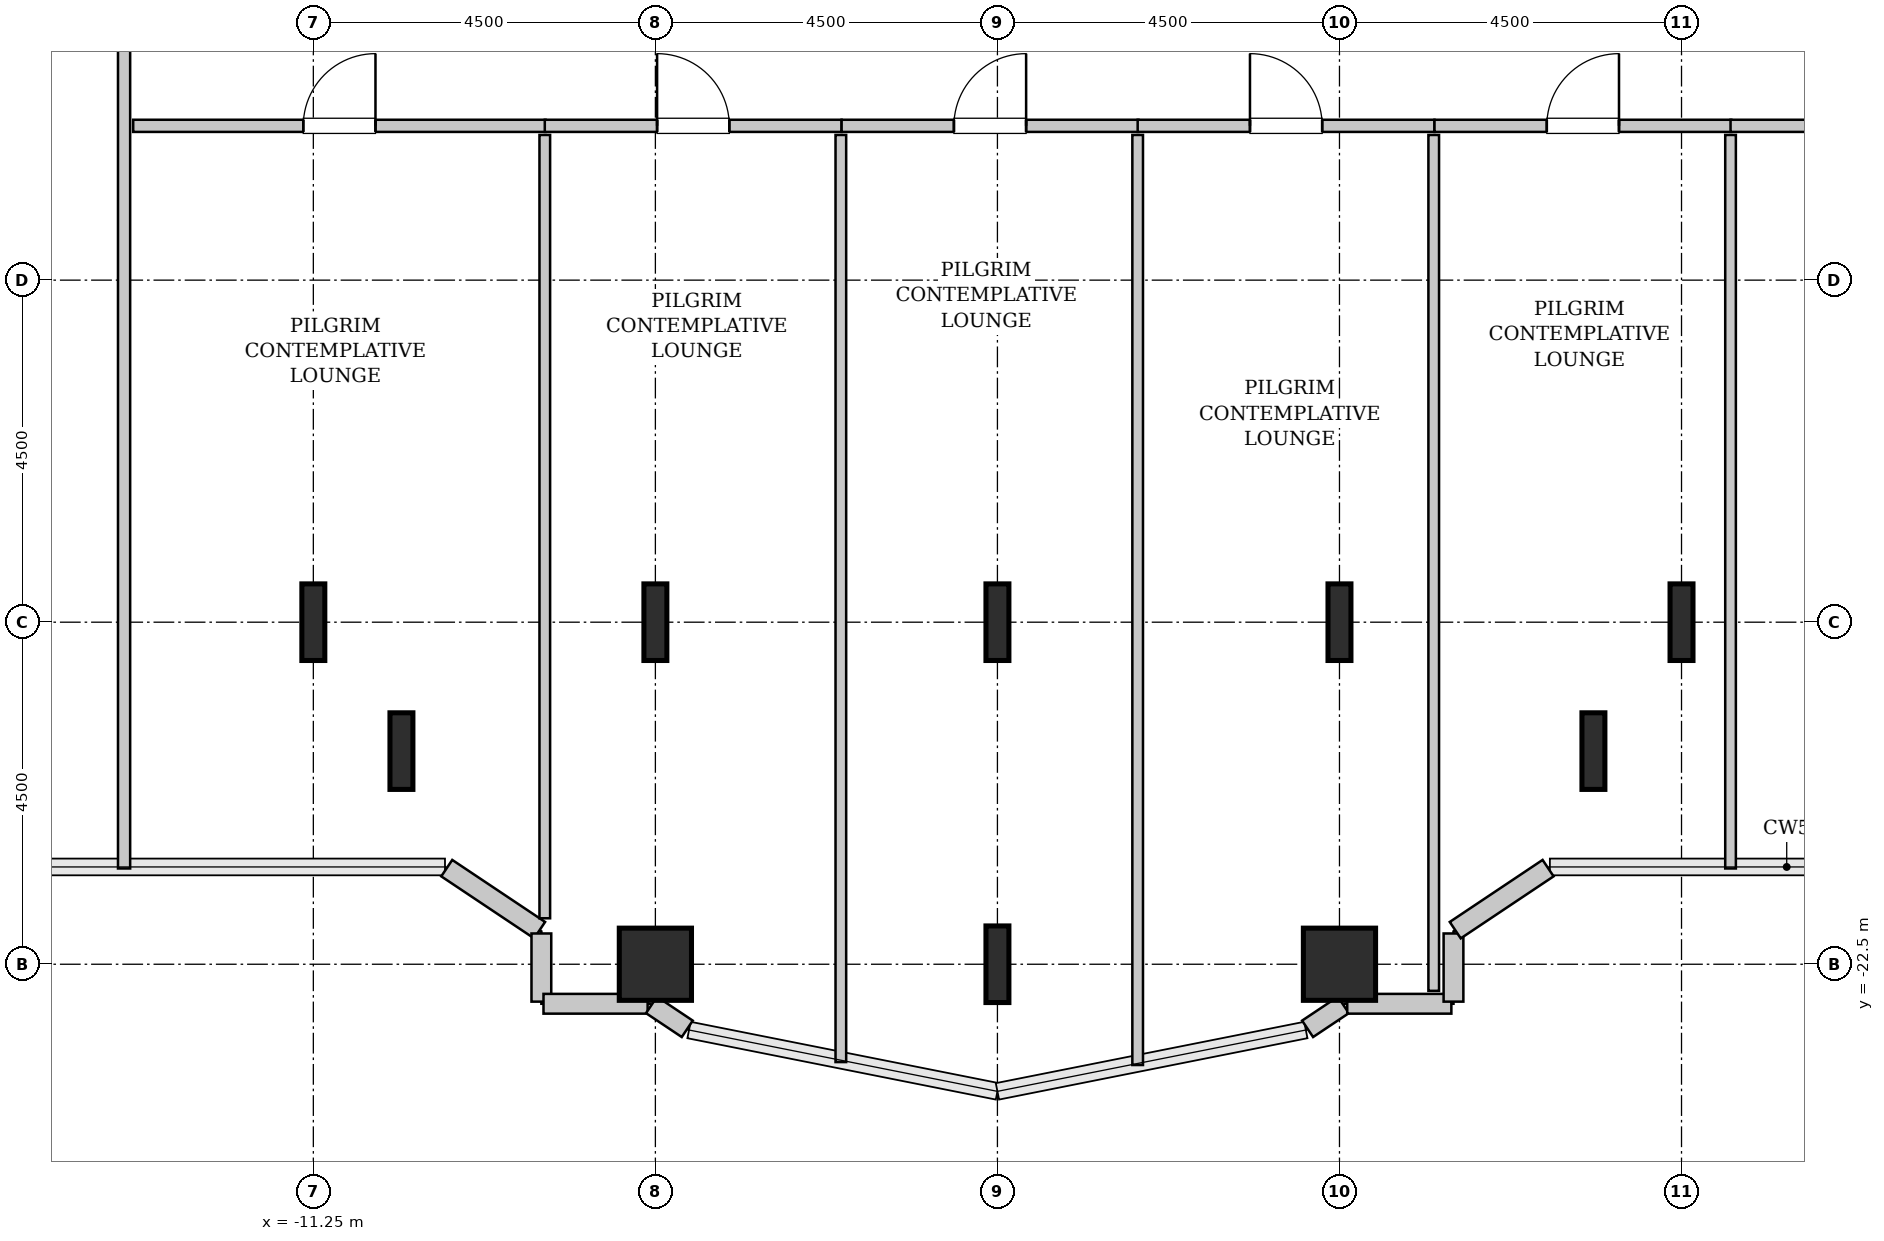
"""IFC4 building model, lengths in metres.
Left out: names, types, materials, properties, quantities, classifications, styles, units other than length and angle.
Written with IfcOpenShell. Run it as: python <this file> out.ifc"""

import sys

from ifc_helpers import new_model, si_unit, direction, frame, frame_2d, origin, origin_2d, place, context, subcontext, project, spatial, rectangle, hollow_rectangle, i_section, extrude, source, transform, mapped, element, fill, save


model = new_model("IFC4")
c1 = context("Model", 3, precision=1e-05, world=origin(), true_north=direction((0.0, 1.0)))
c2 = subcontext(c1, "Body", "Model", "MODEL_VIEW")
j1 = project(units=[si_unit("LENGTHUNIT", "METRE"), si_unit("PLANEANGLEUNIT", "RADIAN")], contexts=[c1])
p1 = place(None, origin())
s1 = spatial("IfcSite", under=j1, at=p1, CompositionType="ELEMENT")
p2 = place(p1, origin())
s2 = spatial("IfcBuilding", under=s1, at=p2, CompositionType="ELEMENT")
p3 = place(p2, frame((0.0, 0.0, 94.6)))
s3 = spatial("IfcBuildingStorey", under=s2, at=p3, CompositionType="ELEMENT", Elevation=94.6)
m1 = source(origin(), c2, "Body", "SweptSolid", [
    extrude(i_section(OverallWidth=0.302, OverallDepth=1.008, WebThickness=0.021, FlangeThickness=0.04, FilletRadius=0.03, at=origin_2d()), origin(), (0.0, 0.0, 1.0), 3.8),
])
for number, where, z_axis, x_axis in (
    (1, (-11.25, -18.0, 0.0), (0.0, 0.0, 1.0), (1.0, 0.0, 0.0)),
    (2, (-10.091, -19.696, 0.0), (0.0, 0.0, 1.0), (1.0, 0.0, 0.0)),
):
    element("IfcColumn", number, at=place(p3, frame(where, z_axis=z_axis, x_axis=x_axis)), inside=s3, PredefinedType="COLUMN", context=c2, shape_type="MappedRepresentation", body=[
        mapped(m1, transform((0.0, 0.0, 0.0), x_axis=(1.0, 0.0, 0.0), y_axis=(0.0, 1.0, 0.0), z_axis=(0.0, 0.0, 1.0), scale=1.0)),
    ])
m2 = source(origin(), c2, "Body", "SweptSolid", [
    extrude(hollow_rectangle(XDim=0.95, YDim=0.95, WallThickness=0.045, InnerFilletRadius=0.045, OuterFilletRadius=0.09, at=origin_2d()), origin(), (0.0, 0.0, 1.0), 3.8),
])
p4 = place(p3, frame((-6.75, -22.5, 0.0), z_axis=(0.0, 0.0, 1.0), x_axis=(1.0, 0.0, 0.0)))
e3 = element("IfcColumn", 3, at=p4, inside=s3, PredefinedType="COLUMN", context=c2, shape_type="MappedRepresentation", body=[
    mapped(m2, transform((0.0, 0.0, 0.0), x_axis=(1.0, 0.0, 0.0), y_axis=(0.0, 1.0, 0.0), z_axis=(0.0, 0.0, 1.0), scale=1.0)),
])
for number, where, z_axis, x_axis in (
    (4, (-6.75, -18.0, 0.0), (0.0, 0.0, 1.0), (1.0, 0.0, 0.0)),
    (5, (-2.25, -22.5, 0.0), (0.0, 0.0, 1.0), (1.0, 0.0, 0.0)),
    (6, (-2.25, -18.0, 0.0), (0.0, 0.0, 1.0), (1.0, 0.0, 0.0)),
):
    element("IfcColumn", number, at=place(p3, frame(where, z_axis=z_axis, x_axis=x_axis)), inside=s3, PredefinedType="COLUMN", context=c2, shape_type="MappedRepresentation", body=[
        mapped(m1, transform((0.0, 0.0, 0.0), x_axis=(1.0, 0.0, 0.0), y_axis=(0.0, 1.0, 0.0), z_axis=(0.0, 0.0, 1.0), scale=1.0)),
    ])
p5 = place(p3, frame((2.25, -22.5, 0.0), z_axis=(0.0, 0.0, 1.0), x_axis=(1.0, 0.0, 0.0)))
e7 = element("IfcColumn", 7, at=p5, inside=s3, PredefinedType="COLUMN", context=c2, shape_type="MappedRepresentation", body=[
    mapped(m2, transform((0.0, 0.0, 0.0), x_axis=(1.0, 0.0, 0.0), y_axis=(0.0, 1.0, 0.0), z_axis=(0.0, 0.0, 1.0), scale=1.0)),
])
for number, where, z_axis, x_axis in (
    (8, (2.25, -18.0, 0.0), (0.0, 0.0, 1.0), (1.0, 0.0, 0.0)),
    (9, (5.591, -19.696, 0.0), (0.0, 0.0, 1.0), (1.0, 0.0, 0.0)),
    (10, (6.75, -18.0, 0.0), (0.0, 0.0, 1.0), (1.0, 0.0, 0.0)),
):
    element("IfcColumn", number, at=place(p3, frame(where, z_axis=z_axis, x_axis=x_axis)), inside=s3, PredefinedType="COLUMN", context=c2, shape_type="MappedRepresentation", body=[
        mapped(m1, transform((0.0, 0.0, 0.0), x_axis=(1.0, 0.0, 0.0), y_axis=(0.0, 1.0, 0.0), z_axis=(0.0, 0.0, 1.0), scale=1.0)),
    ])
m3 = source(origin(), c2, "Body", "SweptSolid", [
    extrude(rectangle(XDim=1.469, YDim=0.26, at=frame_2d((0.734, 0.0))), origin(), (0.0, 0.0, 1.0), 3.55),
])
p6 = place(p3, frame((-9.495, -21.236, 0.0), z_axis=(0.0, 0.0, 1.0), x_axis=(0.831461760506, -0.555581983884, 0.0)))
e11 = element("IfcWall", 11, at=p6, inside=s3, PredefinedType="SOLIDWALL", context=c2, shape_type="MappedRepresentation", body=[
    mapped(m3, transform((0.0, 0.0, 0.0), x_axis=(1.0, 0.0, 0.0), y_axis=(0.0, 1.0, 0.0), z_axis=(0.0, 0.0, 1.0), scale=1.0)),
])
m4 = source(origin(), c2, "Body", "SweptSolid", [
    extrude(rectangle(XDim=0.897, YDim=0.26, at=frame_2d((0.448, 0.0))), origin(), (0.0, 0.0, 1.0), 3.55),
])
p7 = place(p3, frame((-8.25, -22.095, 0.0), z_axis=(0.0, 0.0, 1.0), x_axis=(0.0, -1.0, 0.0)))
e12 = element("IfcWall", 12, at=p7, inside=s3, PredefinedType="SOLIDWALL", context=c2, shape_type="MappedRepresentation", body=[
    mapped(m4, transform((0.0, 0.0, 0.0), x_axis=(1.0, 0.0, 0.0), y_axis=(0.0, 1.0, 0.0), z_axis=(0.0, 0.0, 1.0), scale=1.0)),
])
m5 = source(origin(), c2, "Body", "SweptSolid", [
    extrude(rectangle(XDim=1.37, YDim=0.26, at=frame_2d((0.685, 0.0))), origin(), (0.0, 0.0, 1.0), 3.55),
])
p8 = place(p3, frame((-8.222, -23.02, 0.0), z_axis=(0.0, 0.0, 1.0), x_axis=(1.0, 0.0, 0.0)))
e13 = element("IfcWall", 13, at=p8, inside=s3, PredefinedType="SOLIDWALL", context=c2, shape_type="MappedRepresentation", body=[
    mapped(m5, transform((0.0, 0.0, 0.0), x_axis=(1.0, 0.0, 0.0), y_axis=(0.0, 1.0, 0.0), z_axis=(0.0, 0.0, 1.0), scale=1.0)),
])
m6 = source(origin(), c2, "Body", "SweptSolid", [
    extrude(rectangle(XDim=0.565, YDim=0.26, at=frame_2d((0.283, 0.0))), origin(), (0.0, 0.0, 1.0), 3.55),
])
for number, where, z_axis, x_axis in (
    (14, (-6.801, -23.036, 0.0), (0.0, 0.0, 1.0), (0.832, -0.555, 0.0)),
    (15, (1.831, -23.35, 0.0), (0.0, 0.0, 1.0), (0.832, 0.555, 0.0)),
):
    element("IfcWall", number, at=place(p3, frame(where, z_axis=z_axis, x_axis=x_axis)), inside=s3, PredefinedType="SOLIDWALL", context=c2, shape_type="MappedRepresentation", body=[
        mapped(m6, transform((0.0, 0.0, 0.0), x_axis=(1.0, 0.0, 0.0), y_axis=(0.0, 1.0, 0.0), z_axis=(0.0, 0.0, 1.0), scale=1.0)),
    ])
p9 = place(p3, frame((2.352, -23.02, 0.0), z_axis=(0.0, 0.0, 1.0), x_axis=(1.0, 0.0, 0.0)))
e16 = element("IfcWall", 16, at=p9, inside=s3, PredefinedType="SOLIDWALL", context=c2, shape_type="MappedRepresentation", body=[
    mapped(m5, transform((0.0, 0.0, 0.0), x_axis=(1.0, 0.0, 0.0), y_axis=(0.0, 1.0, 0.0), z_axis=(0.0, 0.0, 1.0), scale=1.0)),
])
p10 = place(p3, frame((3.75, -22.992, 0.0), z_axis=(0.0, 0.0, 1.0), x_axis=(0.0, 1.0, 0.0)))
e17 = element("IfcWall", 17, at=p10, inside=s3, PredefinedType="SOLIDWALL", context=c2, shape_type="MappedRepresentation", body=[
    mapped(m4, transform((0.0, 0.0, 0.0), x_axis=(1.0, 0.0, 0.0), y_axis=(0.0, 1.0, 0.0), z_axis=(0.0, 0.0, 1.0), scale=1.0)),
])
p11 = place(p3, frame((3.773, -22.052, 0.0), z_axis=(0.0, 0.0, 1.0), x_axis=(0.831461760506, 0.555581983884, 0.0)))
e18 = element("IfcWall", 18, at=p11, inside=s3, PredefinedType="SOLIDWALL", context=c2, shape_type="MappedRepresentation", body=[
    mapped(m3, transform((0.0, 0.0, 0.0), x_axis=(1.0, 0.0, 0.0), y_axis=(0.0, 1.0, 0.0), z_axis=(0.0, 0.0, 1.0), scale=1.0)),
])
m7 = source(origin(), c2, "Body", "SweptSolid", [
    extrude(rectangle(XDim=12.845, YDim=0.16, at=frame_2d((6.422, 0.0))), origin(), (0.0, 0.0, 1.0), 3.535),
])
p12 = place(p3, frame((-13.74, -21.24, 0.0), z_axis=(0.0, 0.0, 1.0), x_axis=(0.0, 1.0, 0.0)))
e19 = element("IfcWall", 19, at=p12, inside=s3, PredefinedType="PARTITIONING", context=c2, shape_type="MappedRepresentation", body=[
    mapped(m7, transform((0.0, 0.0, 0.0), x_axis=(1.0, 0.0, 0.0), y_axis=(0.0, 1.0, 0.0), z_axis=(0.0, 0.0, 1.0), scale=1.0)),
])
p13 = place(p12, frame((10.812, 0.0, 0.0)))
e20 = element("IfcOpeningElement", 20, at=p13, cuts=e19, PredefinedType="OPENING", context=c2, shape_type="SweptSolid", body=[
    extrude(rectangle(XDim=0.95, YDim=2.1, at=frame_2d((0.475, 1.05))), frame((0.0, 0.09, 0.0), z_axis=(0.0, -1.0, 0.0), x_axis=(1.0, 0.0, 0.0)), (0.0, 0.0, 1.0), 0.18),
])
m8 = source(origin(), c2, "Body", "SweptSolid", [
    extrude(rectangle(XDim=5.425, YDim=0.16, at=frame_2d((2.712, 0.0))), origin(), (0.0, 0.0, 1.0), 3.535),
])
p14 = place(p3, frame((-13.62, -11.47, 0.0), z_axis=(0.0, 0.0, 1.0), x_axis=(1.0, 0.0, 0.0)))
e21 = element("IfcWall", 21, at=p14, inside=s3, PredefinedType="PARTITIONING", context=c2, shape_type="MappedRepresentation", body=[
    mapped(m8, transform((0.0, 0.0, 0.0), x_axis=(1.0, 0.0, 0.0), y_axis=(0.0, 1.0, 0.0), z_axis=(0.0, 0.0, 1.0), scale=1.0)),
])
p15 = place(p14, frame((2.238, 0.0, 0.0)))
e22 = element("IfcOpeningElement", 22, at=p15, cuts=e21, PredefinedType="OPENING", context=c2, shape_type="SweptSolid", body=[
    extrude(rectangle(XDim=0.95, YDim=2.1, at=frame_2d((0.475, 1.05))), frame((0.0, 0.09, 0.0), z_axis=(0.0, -1.0, 0.0), x_axis=(1.0, 0.0, 0.0)), (0.0, 0.0, 1.0), 0.18),
])
m9 = source(origin(), c2, "Body", "SweptSolid", [
    extrude(rectangle(XDim=10.305, YDim=0.14, at=frame_2d((5.153, 0.0))), origin(), (0.0, 0.0, 1.0), 3.535),
])
p16 = place(p3, frame((-8.205, -21.895, 0.0), z_axis=(0.0, 0.0, 1.0), x_axis=(0.0, 1.0, 0.0)))
e23 = element("IfcWall", 23, at=p16, inside=s3, PredefinedType="PARTITIONING", context=c2, shape_type="MappedRepresentation", body=[
    mapped(m9, transform((0.0, 0.0, 0.0), x_axis=(1.0, 0.0, 0.0), y_axis=(0.0, 1.0, 0.0), z_axis=(0.0, 0.0, 1.0), scale=1.0)),
])
m10 = source(origin(), c2, "Body", "SweptSolid", [
    extrude(rectangle(XDim=3.905, YDim=0.16, at=frame_2d((1.953, 0.0))), origin(), (0.0, 0.0, 1.0), 3.535),
])
p17 = place(p3, frame((-8.205, -11.47, 0.0), z_axis=(0.0, 0.0, 1.0), x_axis=(1.0, 0.0, 0.0)))
e24 = element("IfcWall", 24, at=p17, inside=s3, PredefinedType="PARTITIONING", context=c2, shape_type="MappedRepresentation", body=[
    mapped(m10, transform((0.0, 0.0, 0.0), x_axis=(1.0, 0.0, 0.0), y_axis=(0.0, 1.0, 0.0), z_axis=(0.0, 0.0, 1.0), scale=1.0)),
])
p18 = place(p17, frame((1.478, 0.0, 0.0)))
e25 = element("IfcOpeningElement", 25, at=p18, cuts=e24, PredefinedType="OPENING", context=c2, shape_type="SweptSolid", body=[
    extrude(rectangle(XDim=0.95, YDim=2.1, at=frame_2d((0.475, 1.05))), frame((0.0, 0.09, 0.0), z_axis=(0.0, -1.0, 0.0), x_axis=(1.0, 0.0, 0.0)), (0.0, 0.0, 1.0), 0.18),
])
m11 = source(origin(), c2, "Body", "SweptSolid", [
    extrude(rectangle(XDim=12.197, YDim=0.14, at=frame_2d((6.099, 0.0))), origin(), (0.0, 0.0, 1.0), 3.535),
])
p19 = place(p3, frame((-4.31, -23.787, 0.0), z_axis=(0.0, 0.0, 1.0), x_axis=(0.0, 1.0, 0.0)))
e26 = element("IfcWall", 26, at=p19, inside=s3, PredefinedType="PARTITIONING", context=c2, shape_type="MappedRepresentation", body=[
    mapped(m11, transform((0.0, 0.0, 0.0), x_axis=(1.0, 0.0, 0.0), y_axis=(0.0, 1.0, 0.0), z_axis=(0.0, 0.0, 1.0), scale=1.0)),
])
p20 = place(p3, frame((-4.3, -11.47, 0.0), z_axis=(0.0, 0.0, 1.0), x_axis=(1.0, 0.0, 0.0)))
e27 = element("IfcWall", 27, at=p20, inside=s3, PredefinedType="PARTITIONING", context=c2, shape_type="MappedRepresentation", body=[
    mapped(m10, transform((0.0, 0.0, 0.0), x_axis=(1.0, 0.0, 0.0), y_axis=(0.0, 1.0, 0.0), z_axis=(0.0, 0.0, 1.0), scale=1.0)),
])
p21 = place(p20, frame((1.478, 0.0, 0.0)))
e28 = element("IfcOpeningElement", 28, at=p21, cuts=e27, PredefinedType="OPENING", context=c2, shape_type="SweptSolid", body=[
    extrude(rectangle(XDim=0.95, YDim=2.1, at=frame_2d((0.475, 1.05))), frame((0.0, 0.09, 0.0), z_axis=(0.0, -1.0, 0.0), x_axis=(1.0, 0.0, 0.0)), (0.0, 0.0, 1.0), 0.18),
])
m12 = source(origin(), c2, "Body", "SweptSolid", [
    extrude(rectangle(XDim=12.236, YDim=0.14, at=frame_2d((6.118, 0.0))), origin(), (0.0, 0.0, 1.0), 3.535),
])
p22 = place(p3, frame((-0.405, -23.826, 0.0), z_axis=(0.0, 0.0, 1.0), x_axis=(0.0, 1.0, 0.0)))
e29 = element("IfcWall", 29, at=p22, inside=s3, PredefinedType="PARTITIONING", context=c2, shape_type="MappedRepresentation", body=[
    mapped(m12, transform((0.0, 0.0, 0.0), x_axis=(1.0, 0.0, 0.0), y_axis=(0.0, 1.0, 0.0), z_axis=(0.0, 0.0, 1.0), scale=1.0)),
])
p23 = place(p3, frame((-0.405, -11.47, 0.0), z_axis=(0.0, 0.0, 1.0), x_axis=(1.0, 0.0, 0.0)))
e30 = element("IfcWall", 30, at=p23, inside=s3, PredefinedType="PARTITIONING", context=c2, shape_type="MappedRepresentation", body=[
    mapped(m10, transform((0.0, 0.0, 0.0), x_axis=(1.0, 0.0, 0.0), y_axis=(0.0, 1.0, 0.0), z_axis=(0.0, 0.0, 1.0), scale=1.0)),
])
p24 = place(p23, frame((1.478, 0.0, 0.0)))
e31 = element("IfcOpeningElement", 31, at=p24, cuts=e30, PredefinedType="OPENING", context=c2, shape_type="SweptSolid", body=[
    extrude(rectangle(XDim=0.95, YDim=2.1, at=frame_2d((0.475, 1.05))), frame((0.0, 0.09, 0.0), z_axis=(0.0, -1.0, 0.0), x_axis=(1.0, 0.0, 0.0)), (0.0, 0.0, 1.0), 0.18),
])
m13 = source(origin(), c2, "Body", "SweptSolid", [
    extrude(rectangle(XDim=11.26, YDim=0.14, at=frame_2d((5.63, 0.0))), origin(), (0.0, 0.0, 1.0), 3.535),
])
p25 = place(p3, frame((3.49, -22.85, 0.0), z_axis=(0.0, 0.0, 1.0), x_axis=(0.0, 1.0, 0.0)))
e32 = element("IfcWall", 32, at=p25, inside=s3, PredefinedType="PARTITIONING", context=c2, shape_type="MappedRepresentation", body=[
    mapped(m13, transform((0.0, 0.0, 0.0), x_axis=(1.0, 0.0, 0.0), y_axis=(0.0, 1.0, 0.0), z_axis=(0.0, 0.0, 1.0), scale=1.0)),
])
p26 = place(p3, frame((3.5, -11.47, 0.0), z_axis=(0.0, 0.0, 1.0), x_axis=(1.0, 0.0, 0.0)))
e33 = element("IfcWall", 33, at=p26, inside=s3, PredefinedType="PARTITIONING", context=c2, shape_type="MappedRepresentation", body=[
    mapped(m10, transform((0.0, 0.0, 0.0), x_axis=(1.0, 0.0, 0.0), y_axis=(0.0, 1.0, 0.0), z_axis=(0.0, 0.0, 1.0), scale=1.0)),
])
p27 = place(p26, frame((1.478, 0.0, 0.0)))
e34 = element("IfcOpeningElement", 34, at=p27, cuts=e33, PredefinedType="OPENING", context=c2, shape_type="SweptSolid", body=[
    extrude(rectangle(XDim=0.95, YDim=2.1, at=frame_2d((0.475, 1.05))), frame((0.0, 0.09, 0.0), z_axis=(0.0, -1.0, 0.0), x_axis=(1.0, 0.0, 0.0)), (0.0, 0.0, 1.0), 0.18),
])
m14 = source(origin(), c2, "Body", "SweptSolid", [
    extrude(rectangle(XDim=9.65, YDim=0.14, at=frame_2d((4.825, 0.0))), origin(), (0.0, 0.0, 1.0), 3.535),
])
p28 = place(p3, frame((7.395, -21.24, 0.0), z_axis=(0.0, 0.0, 1.0), x_axis=(0.0, 1.0, 0.0)))
e35 = element("IfcWall", 35, at=p28, inside=s3, PredefinedType="PARTITIONING", context=c2, shape_type="MappedRepresentation", body=[
    mapped(m14, transform((0.0, 0.0, 0.0), x_axis=(1.0, 0.0, 0.0), y_axis=(0.0, 1.0, 0.0), z_axis=(0.0, 0.0, 1.0), scale=1.0)),
])
m15 = source(origin(), c2, "Body", "SweptSolid", [
    extrude(rectangle(XDim=6.225, YDim=0.16, at=frame_2d((3.113, 0.0))), origin(), (0.0, 0.0, 1.0), 3.535),
])
p29 = place(p3, frame((7.395, -11.47, 0.0), z_axis=(0.0, 0.0, 1.0), x_axis=(1.0, 0.0, 0.0)))
e36 = element("IfcWall", 36, at=p29, inside=s3, PredefinedType="PARTITIONING", context=c2, shape_type="MappedRepresentation", body=[
    mapped(m15, transform((0.0, 0.0, 0.0), x_axis=(1.0, 0.0, 0.0), y_axis=(0.0, 1.0, 0.0), z_axis=(0.0, 0.0, 1.0), scale=1.0)),
])
p30 = place(p29, frame((2.637, 0.0, 0.0)))
e37 = element("IfcOpeningElement", 37, at=p30, cuts=e36, PredefinedType="OPENING", context=c2, shape_type="SweptSolid", body=[
    extrude(rectangle(XDim=0.95, YDim=2.1, at=frame_2d((0.475, 1.05))), frame((0.0, 0.09, 0.0), z_axis=(0.0, -1.0, 0.0), x_axis=(1.0, 0.0, 0.0)), (0.0, 0.0, 1.0), 0.18),
])
m16 = source(origin(), c2, "Body", "SweptSolid", [
    extrude(rectangle(XDim=0.95, YDim=2.1, at=frame_2d((0.475, 1.05))), frame((0.0, 0.025, 0.0), z_axis=(0.0, -1.0, 0.0), x_axis=(1.0, 0.0, 0.0)), (0.0, 0.0, 1.0), 0.05),
])
p31 = place(p15, origin())
e38 = element("IfcDoor", 38, at=p31, inside=s3, OperationType="SINGLE_SWING_RIGHT", PredefinedType="DOOR", context=c2, shape_type="MappedRepresentation", body=[
    mapped(m16, transform((0.0, 0.0, 0.0), x_axis=(1.0, 0.0, 0.0), y_axis=(0.0, 1.0, 0.0), z_axis=(0.0, 0.0, 1.0), scale=1.0)),
])
fill(e22, e38)
p32 = place(p18, origin())
e39 = element("IfcDoor", 39, at=p32, inside=s3, OperationType="SINGLE_SWING_LEFT", PredefinedType="DOOR", context=c2, shape_type="MappedRepresentation", body=[
    mapped(m16, transform((0.0, 0.0, 0.0), x_axis=(1.0, 0.0, 0.0), y_axis=(0.0, 1.0, 0.0), z_axis=(0.0, 0.0, 1.0), scale=1.0)),
])
fill(e25, e39)
p33 = place(p21, origin())
e40 = element("IfcDoor", 40, at=p33, inside=s3, OperationType="SINGLE_SWING_RIGHT", PredefinedType="DOOR", context=c2, shape_type="MappedRepresentation", body=[
    mapped(m16, transform((0.0, 0.0, 0.0), x_axis=(1.0, 0.0, 0.0), y_axis=(0.0, 1.0, 0.0), z_axis=(0.0, 0.0, 1.0), scale=1.0)),
])
fill(e28, e40)
p34 = place(p24, origin())
e41 = element("IfcDoor", 41, at=p34, inside=s3, OperationType="SINGLE_SWING_LEFT", PredefinedType="DOOR", context=c2, shape_type="MappedRepresentation", body=[
    mapped(m16, transform((0.0, 0.0, 0.0), x_axis=(1.0, 0.0, 0.0), y_axis=(0.0, 1.0, 0.0), z_axis=(0.0, 0.0, 1.0), scale=1.0)),
])
fill(e31, e41)
p35 = place(p27, origin())
e42 = element("IfcDoor", 42, at=p35, inside=s3, OperationType="SINGLE_SWING_RIGHT", PredefinedType="DOOR", context=c2, shape_type="MappedRepresentation", body=[
    mapped(m16, transform((0.0, 0.0, 0.0), x_axis=(1.0, 0.0, 0.0), y_axis=(0.0, 1.0, 0.0), z_axis=(0.0, 0.0, 1.0), scale=1.0)),
])
fill(e34, e42)
save(model, sys.argv[1])
